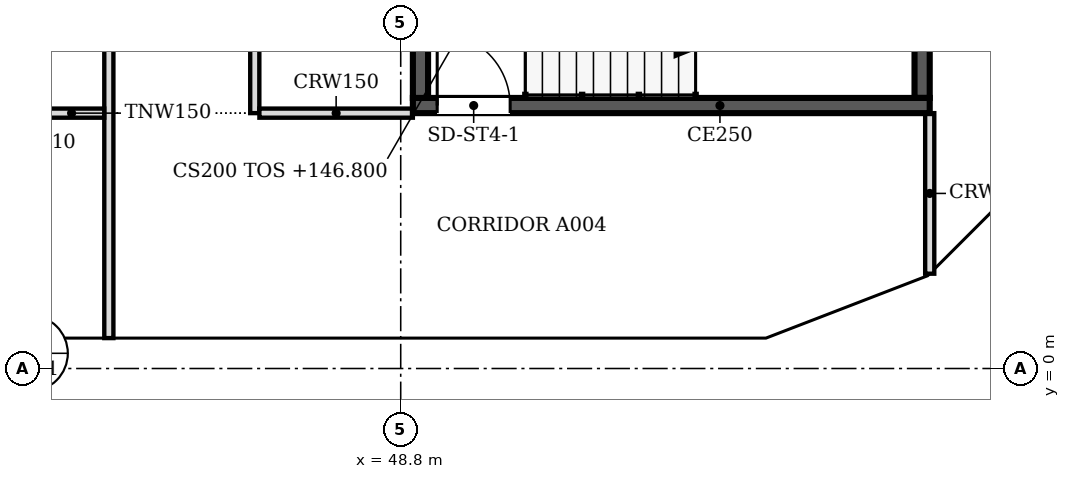
"""IFC4 building model, lengths in metres.
Left out: names, types, materials, properties, quantities, classifications, styles, units other than length and angle.
Written with IfcOpenShell. Run it as: python <this file> out.ifc"""

import sys

from ifc_helpers import new_model, si_unit, direction, frame, frame_2d, origin, place, context, subcontext, project, spatial, polyline, rectangle, outline, extrude, faceted_brep, source, transform, mapped, element, fill, save


model = new_model("IFC4")
c1 = context("Model", 3, precision=1e-05, world=origin(), true_north=direction((0.0, 1.0)))
c2 = subcontext(c1, "Body", "Model", "MODEL_VIEW")
j1 = project(units=[si_unit("LENGTHUNIT", "METRE"), si_unit("PLANEANGLEUNIT", "RADIAN")], contexts=[c1])
p1 = place(None, origin())
s1 = spatial("IfcSite", under=j1, at=p1, CompositionType="ELEMENT")
p2 = place(p1, origin())
s2 = spatial("IfcBuilding", under=s1, at=p2, CompositionType="ELEMENT")
p3 = place(p2, frame((0.0, 0.0, 146.8)))
s3 = spatial("IfcBuildingStorey", under=s2, at=p3, CompositionType="ELEMENT", Elevation=146.8)
m1 = source(origin(), c2, "Body", "SweptSolid", [
    extrude(outline(polyline([(3.05, 0.0), (6.1, 3.8), (3.05, 7.6), (0.0, 3.8), (3.05, 0.0)])), frame((0.0, 0.25, 0.0), z_axis=(0.0, -1.0, 0.0), x_axis=(1.0, 0.0, 0.0)), (0.0, 0.0, 1.0), 0.5),
])
p4 = place(p3, frame((42.7, 0.25, -3.8), z_axis=(0.0, 0.0, 1.0), x_axis=(1.0, 0.0, 0.0)))
e1 = element("IfcWall", 1, at=p4, inside=s3, PredefinedType="SOLIDWALL", context=c2, shape_type="MappedRepresentation", body=[
    mapped(m1, transform((0.0, 0.0, 0.0), scale=1.0)),
])
m2 = source(origin(), c2, "Body", "SweptSolid", [
    extrude(outline(polyline([(3.05, 0.399), (5.78, 3.8), (3.05, 7.201), (0.321, 3.8), (3.05, 0.399)])), frame((0.0, 0.26, 0.0), z_axis=(0.0, -1.0, 0.0), x_axis=(1.0, 0.0, 0.0)), (0.0, 0.0, 1.0), 0.52),
])
p5 = place(p4, origin())
e2 = element("IfcOpeningElement", 2, at=p5, cuts=e1, PredefinedType="OPENING", context=c2, shape_type="MappedRepresentation", body=[
    mapped(m2, transform((0.0, 0.0, 0.0), scale=1.0)),
])
m3 = source(origin(), c2, "Body", "Brep", [
    faceted_brep([(3.05, -0.25, 0.0), (6.053, -0.25, 3.8), (3.05, -0.25, 7.6), (0.0, -0.25, 3.8), (0.0, 0.25, 3.8), (3.05, 0.25, 7.6), (6.007, 0.25, 3.859), (6.007, 0.25, 3.741), (3.05, 0.25, 0.0), (6.053, 0.0, 3.8)], [[[0, 1, 2, 3]], [[4, 5, 6, 7, 8]], [[8, 7, 9, 1, 0]], [[6, 5, 2, 1, 9]], [[5, 4, 3, 2]], [[4, 8, 0, 3]], [[9, 7, 6]]]),
])
p6 = place(p3, frame((48.8, 0.25, -3.8), z_axis=(0.0, 0.0, 1.0), x_axis=(1.0, 0.0, 0.0)))
e3 = element("IfcWall", 3, at=p6, inside=s3, PredefinedType="SOLIDWALL", context=c2, shape_type="MappedRepresentation", body=[
    mapped(m3, transform((0.0, 0.0, 0.0), scale=1.0)),
])
m4 = source(origin(), c2, "Body", "SweptSolid", [
    extrude(outline(polyline([(3.049, 0.401), (5.735, 3.8), (3.049, 7.199), (0.321, 3.8), (3.049, 0.401)])), frame((0.0, 0.26, 0.0), z_axis=(0.0, -1.0, 0.0), x_axis=(1.0, 0.0, 0.0)), (0.0, 0.0, 1.0), 0.52),
])
p7 = place(p6, origin())
e4 = element("IfcOpeningElement", 4, at=p7, cuts=e3, PredefinedType="OPENING", context=c2, shape_type="MappedRepresentation", body=[
    mapped(m4, transform((0.0, 0.0, 0.0), scale=1.0)),
])
m5 = source(origin(), c2, "Body", "Brep", [
    faceted_brep([(2.95, -0.25, 0.0), (3.003, -0.25, 0.068), (3.003, -0.25, 7.532), (2.95, -0.25, 7.6), (0.0, -0.25, 3.8), (0.047, 0.25, 3.86), (2.898, 0.25, 7.532), (2.898, 0.25, 0.068), (0.047, 0.25, 3.74), (2.95, 0.0, 0.0), (2.95, 0.0, 7.6), (0.0, 0.0, 3.8)], [[[0, 1, 2, 3, 4]], [[5, 6, 7, 8]], [[1, 0, 9]], [[10, 3, 2]], [[6, 5, 11, 4, 3, 10]], [[8, 7, 9, 0, 4, 11]], [[8, 11, 5]], [[1, 9, 7, 6, 10, 2]]]),
])
p8 = place(p3, frame((54.854, 0.25, -3.8), z_axis=(0.0, 0.0, 1.0), x_axis=(0.932970071518, 0.359953949349, 0.0)))
e5 = element("IfcWall", 5, at=p8, inside=s3, PredefinedType="SOLIDWALL", context=c2, shape_type="MappedRepresentation", body=[
    mapped(m5, transform((0.0, 0.0, 0.0), scale=1.0)),
])
m6 = source(origin(), c2, "Body", "SweptSolid", [
    extrude(outline(polyline([(2.75, 6.935), (0.316, 3.8), (2.75, 0.665), (2.75, 6.935)])), frame((0.0, 0.26, 0.0), z_axis=(0.0, -1.0, 0.0), x_axis=(1.0, 0.0, 0.0)), (0.0, 0.0, 1.0), 0.52),
])
p9 = place(p8, origin())
e6 = element("IfcOpeningElement", 6, at=p9, cuts=e5, PredefinedType="OPENING", context=c2, shape_type="MappedRepresentation", body=[
    mapped(m6, transform((0.0, 0.0, 0.0), scale=1.0)),
])
m7 = source(origin(), c2, "Body", "Brep", [
    faceted_brep([(0.053, -0.25, 0.0), (2.997, -0.25, 3.8), (0.053, -0.25, 7.6), (0.0, -0.25, 7.532), (0.0, -0.25, 0.068), (0.106, 0.25, 7.532), (2.944, 0.25, 3.868), (2.944, 0.25, 3.732), (0.106, 0.25, 0.068), (2.997, 0.0, 3.8), (0.053, 0.0, 0.0), (0.053, 0.0, 7.6)], [[[0, 1, 2, 3, 4]], [[5, 6, 7, 8]], [[8, 7, 9, 1, 0, 10]], [[6, 5, 11, 2, 1, 9]], [[3, 2, 11]], [[10, 0, 4]], [[8, 10, 4, 3, 11, 5]], [[9, 7, 6]]]),
])
p10 = place(p3, frame((57.569, 1.274, -3.8), z_axis=(0.0, 0.0, 1.0), x_axis=(0.707066050402, 0.707147509625, 0.0)))
e7 = element("IfcWall", 7, at=p10, inside=s3, PredefinedType="SOLIDWALL", context=c2, shape_type="MappedRepresentation", body=[
    mapped(m7, transform((0.0, 0.0, 0.0), scale=1.0)),
])
m8 = source(origin(), c2, "Body", "SweptSolid", [
    extrude(outline(polyline([(0.253, 0.666), (2.681, 3.8), (0.253, 6.934), (0.253, 0.666)])), frame((0.0, 0.26, 0.0), z_axis=(0.0, -1.0, 0.0), x_axis=(1.0, 0.0, 0.0)), (0.0, 0.0, 1.0), 0.52),
])
p11 = place(p10, origin())
e8 = element("IfcOpeningElement", 8, at=p11, cuts=e7, PredefinedType="OPENING", context=c2, shape_type="MappedRepresentation", body=[
    mapped(m8, transform((0.0, 0.0, 0.0), scale=1.0)),
])
m9 = source(origin(), c2, "Body", "SweptSolid", [
    extrude(outline(polyline([(3.05, 0.0), (6.1, 3.8), (0.0, 3.8), (3.05, 0.0)])), frame((0.0, 0.25, 0.0), z_axis=(0.0, -1.0, 0.0), x_axis=(1.0, 0.0, 0.0)), (0.0, 0.0, 1.0), 0.5),
])
p12 = place(p3, frame((39.65, 0.25, 0.0), z_axis=(0.0, 0.0, 1.0), x_axis=(1.0, 0.0, 0.0)))
e9 = element("IfcWall", 9, at=p12, inside=s3, PredefinedType="SOLIDWALL", context=c2, shape_type="MappedRepresentation", body=[
    mapped(m9, transform((0.0, 0.0, 0.0), scale=1.0)),
])
m10 = source(origin(), c2, "Body", "SweptSolid", [
    extrude(outline(polyline([(3.05, 0.399), (5.579, 3.55), (0.521, 3.55), (3.05, 0.399)])), frame((0.0, 0.26, 0.0), z_axis=(0.0, -1.0, 0.0), x_axis=(1.0, 0.0, 0.0)), (0.0, 0.0, 1.0), 0.52),
])
p13 = place(p12, origin())
e10 = element("IfcOpeningElement", 10, at=p13, cuts=e9, PredefinedType="OPENING", context=c2, shape_type="MappedRepresentation", body=[
    mapped(m10, transform((0.0, 0.0, 0.0), scale=1.0)),
])
p14 = place(p3, frame((45.75, 0.25, 0.0), z_axis=(0.0, 0.0, 1.0), x_axis=(1.0, 0.0, 0.0)))
e11 = element("IfcWall", 11, at=p14, inside=s3, PredefinedType="SOLIDWALL", context=c2, shape_type="MappedRepresentation", body=[
    mapped(m9, transform((0.0, 0.0, 0.0), scale=1.0)),
])
p15 = place(p14, origin())
e12 = element("IfcOpeningElement", 12, at=p15, cuts=e11, PredefinedType="OPENING", context=c2, shape_type="MappedRepresentation", body=[
    mapped(m10, transform((0.0, 0.0, 0.0), scale=1.0)),
])
m11 = source(origin(), c2, "Body", "Brep", [
    faceted_brep([(3.003, -0.25, 0.0), (3.05, -0.25, 0.06), (3.05, -0.25, 3.8), (0.0, -0.25, 3.8), (0.0, 0.25, 3.8), (2.957, 0.25, 3.8), (2.957, 0.25, 0.059), (3.003, 0.0, 0.0)], [[[0, 1, 2, 3]], [[4, 5, 6]], [[1, 0, 7]], [[5, 4, 3, 2]], [[4, 6, 7, 0, 3]], [[1, 7, 6, 5, 2]]]),
])
p16 = place(p3, frame((51.85, 0.25, 0.0), z_axis=(0.0, 0.0, 1.0), x_axis=(1.0, 0.0, 0.0)))
e13 = element("IfcWall", 13, at=p16, inside=s3, PredefinedType="SOLIDWALL", context=c2, shape_type="MappedRepresentation", body=[
    mapped(m11, transform((0.0, 0.0, 0.0), scale=1.0)),
])
m12 = source(origin(), c2, "Body", "SweptSolid", [
    extrude(outline(polyline([(2.803, 3.55), (0.516, 3.55), (2.803, 0.656), (2.803, 3.55)])), frame((0.0, 0.26, 0.0), z_axis=(0.0, -1.0, 0.0), x_axis=(1.0, 0.0, 0.0)), (0.0, 0.0, 1.0), 0.52),
])
p17 = place(p16, origin())
e14 = element("IfcOpeningElement", 14, at=p17, cuts=e13, PredefinedType="OPENING", context=c2, shape_type="MappedRepresentation", body=[
    mapped(m12, transform((0.0, 0.0, 0.0), scale=1.0)),
])
m13 = source(origin(), c2, "Body", "Brep", [
    faceted_brep([(0.047, -0.25, 0.0), (2.997, -0.25, 3.8), (0.0, -0.25, 3.8), (0.0, -0.25, 0.059), (0.093, 0.25, 3.8), (2.944, 0.25, 3.8), (2.944, 0.25, 3.732), (0.093, 0.25, 0.06), (2.997, 0.0, 3.8), (0.047, 0.0, 0.0)], [[[0, 1, 2, 3]], [[4, 5, 6, 7]], [[7, 6, 8, 1, 0, 9]], [[5, 4, 2, 1, 8]], [[9, 0, 3]], [[7, 9, 3, 2, 4]], [[6, 5, 8]]]),
])
p18 = place(p3, frame((54.81, 0.233, 0.0), z_axis=(0.0, 0.0, 1.0), x_axis=(0.932990326376, 0.359901446078, 0.0)))
e15 = element("IfcWall", 15, at=p18, inside=s3, PredefinedType="SOLIDWALL", context=c2, shape_type="MappedRepresentation", body=[
    mapped(m13, transform((0.0, 0.0, 0.0), scale=1.0)),
])
m14 = source(origin(), c2, "Body", "SweptSolid", [
    extrude(outline(polyline([(0.247, 0.665), (2.487, 3.55), (0.247, 3.55), (0.247, 0.665)])), frame((0.0, 0.26, 0.0), z_axis=(0.0, -1.0, 0.0), x_axis=(1.0, 0.0, 0.0)), (0.0, 0.0, 1.0), 0.52),
])
p19 = place(p18, origin())
e16 = element("IfcOpeningElement", 16, at=p19, cuts=e15, PredefinedType="OPENING", context=c2, shape_type="MappedRepresentation", body=[
    mapped(m14, transform((0.0, 0.0, 0.0), scale=1.0)),
])
m15 = source(origin(), c2, "Body", "Brep", [
    faceted_brep([(2.944, -0.25, 0.0), (2.997, -0.25, 0.068), (2.997, -0.25, 3.8), (0.0, -0.25, 3.8), (0.053, 0.25, 3.8), (2.891, 0.25, 3.8), (2.891, 0.25, 0.068), (0.053, 0.25, 3.732), (2.944, 0.0, 0.0), (0.0, 0.0, 3.8)], [[[0, 1, 2, 3]], [[4, 5, 6, 7]], [[1, 0, 8]], [[5, 4, 9, 3, 2]], [[7, 6, 8, 0, 3, 9]], [[7, 9, 4]], [[1, 8, 6, 5, 2]]]),
])
p20 = place(p3, frame((57.606, 1.312, 0.0), z_axis=(0.0, 0.0, 1.0), x_axis=(0.707147509625, 0.707066050402, 0.0)))
e17 = element("IfcWall", 17, at=p20, inside=s3, PredefinedType="SOLIDWALL", context=c2, shape_type="MappedRepresentation", body=[
    mapped(m15, transform((0.0, 0.0, 0.0), scale=1.0)),
])
m16 = source(origin(), c2, "Body", "SweptSolid", [
    extrude(outline(polyline([(2.744, 3.55), (0.51, 3.55), (2.744, 0.666), (2.744, 3.55)])), frame((0.0, 0.26, 0.0), z_axis=(0.0, -1.0, 0.0), x_axis=(1.0, 0.0, 0.0)), (0.0, 0.0, 1.0), 0.52),
])
p21 = place(p20, origin())
e18 = element("IfcOpeningElement", 18, at=p21, cuts=e17, PredefinedType="OPENING", context=c2, shape_type="MappedRepresentation", body=[
    mapped(m16, transform((0.0, 0.0, 0.0), scale=1.0)),
])
p22 = place(p3, frame((57.5, 4.325, 0.0), z_axis=(0.0, 0.0, 1.0), x_axis=(-1.0, 0.0, 0.0)))
e19 = element("IfcWall", 19, at=p22, inside=s3, PredefinedType="SOLIDWALL", context=c2, shape_type="SweptSolid", body=[
    extrude(rectangle(XDim=8.5, YDim=0.25, at=frame_2d((4.25, 0.0))), origin(), (0.0, 0.0, 1.0), 3.8),
])
m17 = source(origin(), c2, "Body", "SweptSolid", [
    extrude(rectangle(XDim=1.2, YDim=2.1, at=frame_2d((0.6, 1.05))), frame((0.0, 0.135, 0.0), z_axis=(0.0, -1.0, 0.0), x_axis=(1.0, 0.0, 0.0)), (0.0, 0.0, 1.0), 0.27),
])
p23 = place(p22, frame((6.9, 0.0, 0.0)))
e20 = element("IfcOpeningElement", 20, at=p23, cuts=e19, PredefinedType="OPENING", context=c2, shape_type="MappedRepresentation", body=[
    mapped(m17, transform((0.0, 0.0, 0.0), scale=1.0)),
])
for number, where, z_axis, x_axis in (
    (21, (49.125, 4.45, 0.0), (0.0, 0.0, 1.0), (0.0, 1.0, 0.0)),
    (22, (57.375, 7.85, 0.0), (0.0, 0.0, 1.0), (0.0, -1.0, 0.0)),
):
    element("IfcWall", number, at=place(p3, frame(where, z_axis=z_axis, x_axis=x_axis)), inside=s3, PredefinedType="SOLIDWALL", context=c2, shape_type="SweptSolid", body=[
        extrude(rectangle(XDim=3.4, YDim=0.25, at=frame_2d((1.7, 0.0))), origin(), (0.0, 0.0, 1.0), 3.8),
    ])
p24 = place(p3, frame((44.0, 0.5, 0.0), z_axis=(0.0, 0.0, 1.0), x_axis=(0.0, 1.0, 0.0)))
e23 = element("IfcWall", 23, at=p24, inside=s3, PredefinedType="PARTITIONING", context=c2, shape_type="SweptSolid", body=[
    extrude(rectangle(XDim=21.424, YDim=0.15, at=frame_2d((10.712, 0.0))), origin(), (0.0, 0.0, 1.0), 2.888),
])
m18 = source(origin(), c2, "Body", "SweptSolid", [
    extrude(rectangle(XDim=1.0, YDim=2.1, at=frame_2d((0.5, 1.05))), frame((0.0, 0.085, 0.0), z_axis=(0.0, -1.0, 0.0), x_axis=(1.0, 0.0, 0.0)), (0.0, 0.0, 1.0), 0.17),
])
p25 = place(p24, frame((6.2, 0.0, 0.0)))
e24 = element("IfcOpeningElement", 24, at=p25, cuts=e23, PredefinedType="OPENING", context=c2, shape_type="MappedRepresentation", body=[
    mapped(m18, transform((0.0, 0.0, 0.0), scale=1.0)),
])
p26 = place(p24, frame((13.5, 0.0, 0.0)))
e25 = element("IfcOpeningElement", 25, at=p26, cuts=e23, PredefinedType="OPENING", context=c2, shape_type="MappedRepresentation", body=[
    mapped(m18, transform((0.0, 0.0, 0.0), scale=1.0)),
])
p27 = place(p3, frame((57.5, 1.559, 0.0), z_axis=(0.0, 0.0, 1.0), x_axis=(0.0, 1.0, 0.0)))
e26 = element("IfcWall", 26, at=p27, inside=s3, PredefinedType="PARTITIONING", context=c2, shape_type="SweptSolid", body=[
    extrude(rectangle(XDim=2.641, YDim=0.15, at=frame_2d((1.32, 0.0))), origin(), (0.0, 0.0, 1.0), 2.888),
])
p28 = place(p3, frame((43.924, 4.2, 0.0), z_axis=(0.0, 0.0, 1.0), x_axis=(-1.0, 0.0, 0.0)))
e27 = element("IfcWall", 27, at=p28, inside=s3, PredefinedType="PARTITIONING", context=c2, shape_type="SweptSolid", body=[
    extrude(rectangle(XDim=2.973, YDim=0.15, at=frame_2d((1.487, 0.0))), origin(), (0.0, 0.0, 1.0), 2.888),
])
m19 = source(origin(), c2, "Body", "SweptSolid", [
    extrude(rectangle(XDim=0.9, YDim=2.1, at=frame_2d((0.45, 1.05))), frame((0.0, 0.085, 0.0), z_axis=(0.0, -1.0, 0.0), x_axis=(1.0, 0.0, 0.0)), (0.0, 0.0, 1.0), 0.17),
])
p29 = place(p28, frame((1.073, 0.0, 0.0)))
e28 = element("IfcOpeningElement", 28, at=p29, cuts=e27, PredefinedType="OPENING", context=c2, shape_type="MappedRepresentation", body=[
    mapped(m19, transform((0.0, 0.0, 0.0), scale=1.0)),
])
p30 = place(p3, frame((46.4, 21.924, 0.0), z_axis=(0.0, 0.0, 1.0), x_axis=(0.0, -1.0, 0.0)))
e29 = element("IfcWall", 29, at=p30, inside=s3, PredefinedType="PARTITIONING", context=c2, shape_type="SweptSolid", body=[
    extrude(rectangle(XDim=17.724, YDim=0.15, at=frame_2d((8.862, 0.0))), origin(), (0.0, 0.0, 1.0), 2.888),
])
p31 = place(p30, frame((3.423, 0.0, 0.0)))
e30 = element("IfcOpeningElement", 30, at=p31, cuts=e29, PredefinedType="OPENING", context=c2, shape_type="MappedRepresentation", body=[
    mapped(m19, transform((0.0, 0.0, 0.0), scale=1.0)),
])
p32 = place(p30, frame((12.324, 0.0, 0.0)))
e31 = element("IfcOpeningElement", 31, at=p32, cuts=e29, PredefinedType="OPENING", context=c2, shape_type="MappedRepresentation", body=[
    mapped(m18, transform((0.0, 0.0, 0.0), scale=1.0)),
])
p33 = place(p3, frame((46.476, 4.2, 0.0), z_axis=(0.0, 0.0, 1.0), x_axis=(1.0, 0.0, 0.0)))
e32 = element("IfcWall", 32, at=p33, inside=s3, PredefinedType="PARTITIONING", context=c2, shape_type="SweptSolid", body=[
    extrude(rectangle(XDim=2.524, YDim=0.15, at=frame_2d((1.262, 0.0))), origin(), (0.0, 0.0, 1.0), 2.888),
])
m20 = source(origin(), c2, "Body", "SweptSolid", [
    extrude(rectangle(XDim=1.2, YDim=2.1, at=frame_2d((0.6, 1.05))), frame((0.0, 0.025, 0.0), z_axis=(0.0, -1.0, 0.0), x_axis=(1.0, 0.0, 0.0)), (0.0, 0.0, 1.0), 0.05),
])
p34 = place(p23, origin())
e33 = element("IfcDoor", 33, at=p34, inside=s3, OperationType="SINGLE_SWING_RIGHT", PredefinedType="DOOR", context=c2, shape_type="MappedRepresentation", body=[
    mapped(m20, transform((0.0, 0.0, 0.0), scale=1.0)),
])
fill(e20, e33)
save(model, sys.argv[1])
